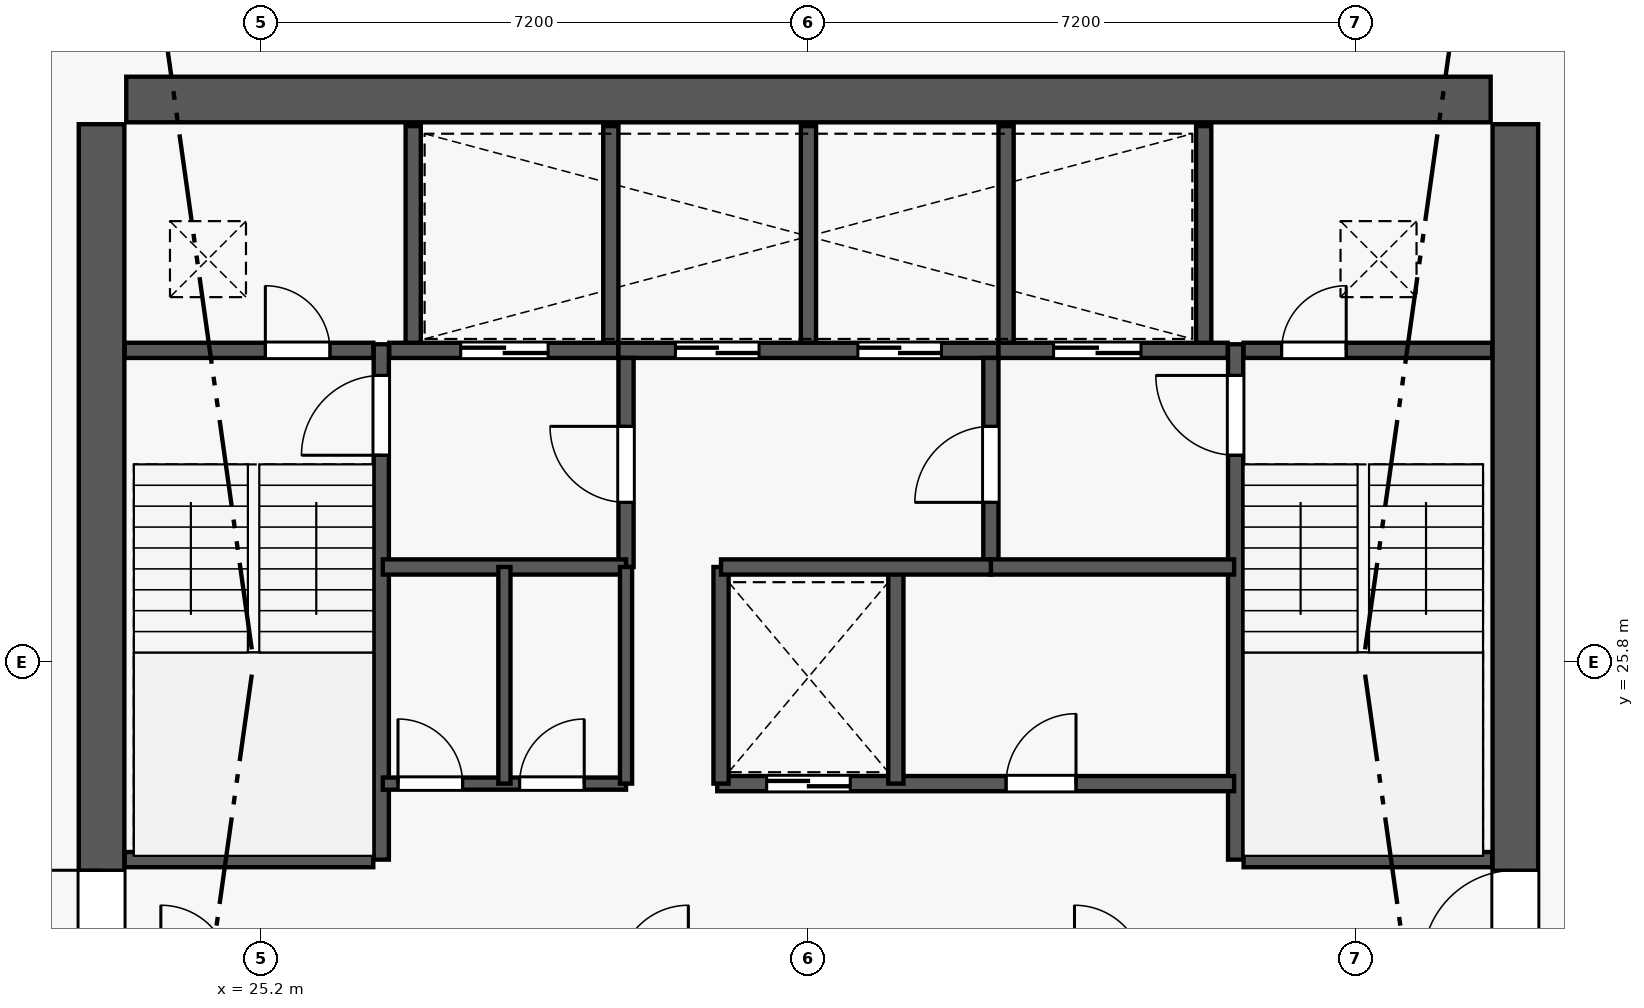
"""IFC4 building model, lengths in metres.
Left out: names, types, materials, properties, quantities, classifications, styles, units other than length and angle.
Written with IfcOpenShell. Run it as: python <this file> out.ifc"""

import sys

from ifc_helpers import new_model, si_unit, direction, frame, frame_2d, origin, origin_2d, place, context, subcontext, project, spatial, rectangle, extrude, element, fill, save


model = new_model("IFC4")
c1 = context("Model", 3, precision=1e-05, world=origin(), true_north=direction((0.0, 1.0)))
c2 = subcontext(c1, "Body", "Model", "MODEL_VIEW")
j1 = project(units=[si_unit("LENGTHUNIT", "METRE"), si_unit("PLANEANGLEUNIT", "RADIAN")], contexts=[c1])
p1 = place(None, origin())
s1 = spatial("IfcSite", under=j1, at=p1, CompositionType="ELEMENT")
p2 = place(p1, origin())
s2 = spatial("IfcBuilding", under=s1, at=p2, CompositionType="ELEMENT")
p3 = place(p2, frame((0.0, 0.0, 186.1)))
s3 = spatial("IfcBuildingStorey", under=s2, at=p3, CompositionType="ELEMENT", Elevation=186.1)
for number, where, z_axis, x_axis in (
    (1, (41.7, 33.2, 0.0), (0.0, 0.0, 1.0), (1.0, 0.0, 0.0)),
    (2, (23.1, 33.2, 0.0), (0.0, 0.0, 1.0), (1.0, 0.0, 0.0)),
):
    element("IfcColumn", number, at=place(p3, frame(where, z_axis=z_axis, x_axis=x_axis)), inside=s3, PredefinedType="COLUMN", context=c2, shape_type="SweptSolid", body=[
        extrude(rectangle(XDim=0.65, YDim=0.65, at=origin_2d()), origin(), (0.0, 0.0, 1.0), 3.55),
    ])
p4 = place(p3, frame((23.425, 33.2, 0.0), z_axis=(0.0, 0.0, 1.0), x_axis=(1.0, 0.0, 0.0)))
e3 = element("IfcWall", 3, at=p4, inside=s3, PredefinedType="SHEAR", context=c2, shape_type="SweptSolid", body=[
    extrude(rectangle(XDim=17.95, YDim=0.6, at=frame_2d((8.975, 0.0))), origin(), (0.0, 0.0, 1.0), 3.35),
])
p5 = place(p3, frame((23.1, 18.925, 0.0), z_axis=(0.0, 0.0, 1.0), x_axis=(0.0, 1.0, 0.0)))
e4 = element("IfcWall", 4, at=p5, inside=s3, PredefinedType="SHEAR", context=c2, shape_type="SweptSolid", body=[
    extrude(rectangle(XDim=13.95, YDim=0.6, at=frame_2d((6.975, 0.0))), origin(), (0.0, 0.0, 1.0), 3.35),
])
p6 = place(p5, frame((2.915, 0.0, 0.0)))
e5 = element("IfcOpeningElement", 5, at=p6, cuts=e4, PredefinedType="OPENING", context=c2, shape_type="SweptSolid", body=[
    extrude(rectangle(XDim=1.22, YDim=2.25, at=frame_2d((0.61, 1.125))), frame((0.0, 0.31, 0.0), z_axis=(0.0, -1.0, 0.0), x_axis=(1.0, 0.0, 0.0)), (0.0, 0.0, 1.0), 0.62),
])
p7 = place(p3, frame((41.7, 18.925, 0.0), z_axis=(0.0, 0.0, 1.0), x_axis=(0.0, 1.0, 0.0)))
e6 = element("IfcWall", 6, at=p7, inside=s3, PredefinedType="SHEAR", context=c2, shape_type="SweptSolid", body=[
    extrude(rectangle(XDim=13.95, YDim=0.6, at=frame_2d((6.975, 0.0))), origin(), (0.0, 0.0, 1.0), 3.35),
])
p8 = place(p7, frame((2.915, 0.0, 0.0)))
e7 = element("IfcOpeningElement", 7, at=p8, cuts=e6, PredefinedType="OPENING", context=c2, shape_type="SweptSolid", body=[
    extrude(rectangle(XDim=1.22, YDim=2.25, at=frame_2d((0.61, 1.125))), frame((0.0, 0.31, 0.0), z_axis=(0.0, -1.0, 0.0), x_axis=(1.0, 0.0, 0.0)), (0.0, 0.0, 1.0), 0.62),
])
p9 = place(p3, frame((26.78, 23.2, 0.0), z_axis=(0.0, 0.0, 1.0), x_axis=(0.0, 1.0, 0.0)))
e8 = element("IfcWall", 8, at=p9, inside=s3, PredefinedType="SHEAR", context=c2, shape_type="SweptSolid", body=[
    extrude(rectangle(XDim=6.78, YDim=0.2, at=frame_2d((3.39, 0.0))), origin(), (0.0, 0.0, 1.0), 3.55),
])
p10 = place(p9, frame((5.32, 0.0, 0.0)))
e9 = element("IfcOpeningElement", 9, at=p10, cuts=e8, PredefinedType="OPENING", context=c2, shape_type="SweptSolid", body=[
    extrude(rectangle(XDim=1.05, YDim=2.15, at=frame_2d((0.525, 1.075))), frame((0.0, 0.11, 0.0), z_axis=(0.0, -1.0, 0.0), x_axis=(1.0, 0.0, 0.0)), (0.0, 0.0, 1.0), 0.22),
])
p11 = place(p3, frame((23.405, 23.2, 0.0), z_axis=(0.0, 0.0, 1.0), x_axis=(1.0, 0.0, 0.0)))
e10 = element("IfcWall", 10, at=p11, inside=s3, PredefinedType="PLUMBINGWALL", context=c2, shape_type="SweptSolid", body=[
    extrude(rectangle(XDim=3.27, YDim=0.2, at=frame_2d((1.635, 0.0))), origin(), (0.0, 0.0, 1.0), 3.35),
])
p12 = place(p3, frame((38.02, 23.2, 0.0), z_axis=(0.0, 0.0, 1.0), x_axis=(0.0, 1.0, 0.0)))
e11 = element("IfcWall", 11, at=p12, inside=s3, PredefinedType="SHEAR", context=c2, shape_type="SweptSolid", body=[
    extrude(rectangle(XDim=6.78, YDim=0.2, at=frame_2d((3.39, 0.0))), origin(), (0.0, 0.0, 1.0), 3.55),
])
p13 = place(p12, frame((5.32, 0.0, 0.0)))
e12 = element("IfcOpeningElement", 12, at=p13, cuts=e11, PredefinedType="OPENING", context=c2, shape_type="SweptSolid", body=[
    extrude(rectangle(XDim=1.05, YDim=2.15, at=frame_2d((0.525, 1.075))), frame((0.0, 0.11, 0.0), z_axis=(0.0, -1.0, 0.0), x_axis=(1.0, 0.0, 0.0)), (0.0, 0.0, 1.0), 0.22),
])
p14 = place(p3, frame((38.125, 23.2, 0.0), z_axis=(0.0, 0.0, 1.0), x_axis=(1.0, 0.0, 0.0)))
e13 = element("IfcWall", 13, at=p14, inside=s3, PredefinedType="PLUMBINGWALL", context=c2, shape_type="SweptSolid", body=[
    extrude(rectangle(XDim=3.27, YDim=0.2, at=frame_2d((1.635, 0.0))), origin(), (0.0, 0.0, 1.0), 3.35),
])
p15 = place(p3, frame((23.405, 29.9, 0.0), z_axis=(0.0, 0.0, 1.0), x_axis=(1.0, 0.0, 0.0)))
e14 = element("IfcWall", 14, at=p15, inside=s3, PredefinedType="PLUMBINGWALL", context=c2, shape_type="SweptSolid", body=[
    extrude(rectangle(XDim=3.27, YDim=0.2, at=frame_2d((1.635, 0.0))), origin(), (0.0, 0.0, 1.0), 3.35),
])
p16 = place(p15, frame((1.85, 0.0, 0.0)))
e15 = element("IfcOpeningElement", 15, at=p16, cuts=e14, PredefinedType="OPENING", context=c2, shape_type="SweptSolid", body=[
    extrude(rectangle(XDim=0.85, YDim=2.05, at=frame_2d((0.425, 1.025))), frame((0.0, 0.11, 0.0), z_axis=(0.0, -1.0, 0.0), x_axis=(1.0, 0.0, 0.0)), (0.0, 0.0, 1.0), 0.22),
])
p17 = place(p3, frame((26.885, 29.9, 0.0), z_axis=(0.0, 0.0, 1.0), x_axis=(1.0, 0.0, 0.0)))
e16 = element("IfcWall", 16, at=p17, inside=s3, PredefinedType="PLUMBINGWALL", context=c2, shape_type="SweptSolid", body=[
    extrude(rectangle(XDim=3.015, YDim=0.2, at=frame_2d((1.507, 0.0))), origin(), (0.0, 0.0, 1.0), 3.35),
])
p18 = place(p17, frame((0.94, 0.0, 0.0)))
e17 = element("IfcOpeningElement", 17, at=p18, cuts=e16, PredefinedType="OPENING", context=c2, shape_type="SweptSolid", body=[
    extrude(rectangle(XDim=1.15, YDim=2.2, at=frame_2d((0.575, 1.1))), frame((0.0, 0.11, 0.0), z_axis=(0.0, -1.0, 0.0), x_axis=(1.0, 0.0, 0.0)), (0.0, 0.0, 1.0), 0.22),
])
p19 = place(p3, frame((29.9, 29.9, 0.0), z_axis=(0.0, 0.0, 1.0), x_axis=(1.0, 0.0, 0.0)))
e18 = element("IfcWall", 18, at=p19, inside=s3, PredefinedType="PLUMBINGWALL", context=c2, shape_type="SweptSolid", body=[
    extrude(rectangle(XDim=5.0, YDim=0.2, at=frame_2d((2.5, 0.0))), origin(), (0.0, 0.0, 1.0), 3.35),
])
p20 = place(p19, frame((0.75, 0.0, 0.0)))
e19 = element("IfcOpeningElement", 19, at=p20, cuts=e18, PredefinedType="OPENING", context=c2, shape_type="SweptSolid", body=[
    extrude(rectangle(XDim=1.1, YDim=2.2, at=frame_2d((0.55, 1.1))), frame((0.0, 0.11, 0.0), z_axis=(0.0, -1.0, 0.0), x_axis=(1.0, 0.0, 0.0)), (0.0, 0.0, 1.0), 0.22),
])
p21 = place(p19, frame((3.15, 0.0, 0.0)))
e20 = element("IfcOpeningElement", 20, at=p21, cuts=e18, PredefinedType="OPENING", context=c2, shape_type="SweptSolid", body=[
    extrude(rectangle(XDim=1.1, YDim=2.2, at=frame_2d((0.55, 1.1))), frame((0.0, 0.11, 0.0), z_axis=(0.0, -1.0, 0.0), x_axis=(1.0, 0.0, 0.0)), (0.0, 0.0, 1.0), 0.22),
])
p22 = place(p3, frame((34.9, 29.9, 0.0), z_axis=(0.0, 0.0, 1.0), x_axis=(1.0, 0.0, 0.0)))
e21 = element("IfcWall", 21, at=p22, inside=s3, PredefinedType="PLUMBINGWALL", context=c2, shape_type="SweptSolid", body=[
    extrude(rectangle(XDim=3.015, YDim=0.2, at=frame_2d((1.508, 0.0))), origin(), (0.0, 0.0, 1.0), 3.35),
])
p23 = place(p22, frame((0.725, 0.0, 0.0)))
e22 = element("IfcOpeningElement", 22, at=p23, cuts=e21, PredefinedType="OPENING", context=c2, shape_type="SweptSolid", body=[
    extrude(rectangle(XDim=1.15, YDim=2.2, at=frame_2d((0.575, 1.1))), frame((0.0, 0.11, 0.0), z_axis=(0.0, -1.0, 0.0), x_axis=(1.0, 0.0, 0.0)), (0.0, 0.0, 1.0), 0.22),
])
p24 = place(p3, frame((38.125, 29.9, 0.0), z_axis=(0.0, 0.0, 1.0), x_axis=(1.0, 0.0, 0.0)))
e23 = element("IfcWall", 23, at=p24, inside=s3, PredefinedType="PLUMBINGWALL", context=c2, shape_type="SweptSolid", body=[
    extrude(rectangle(XDim=3.27, YDim=0.2, at=frame_2d((1.635, 0.0))), origin(), (0.0, 0.0, 1.0), 3.35),
])
p25 = place(p24, frame((0.5, 0.0, 0.0)))
e24 = element("IfcOpeningElement", 24, at=p25, cuts=e23, PredefinedType="OPENING", context=c2, shape_type="SweptSolid", body=[
    extrude(rectangle(XDim=0.85, YDim=2.05, at=frame_2d((0.425, 1.025))), frame((0.0, 0.11, 0.0), z_axis=(0.0, -1.0, 0.0), x_axis=(1.0, 0.0, 0.0)), (0.0, 0.0, 1.0), 0.22),
])
for number, where, z_axis, x_axis in (
    (25, (27.2, 30.0, 0.0), (0.0, 0.0, 1.0), (0.0, 1.0, 0.0)),
    (26, (29.8, 30.0, 0.0), (0.0, 0.0, 1.0), (0.0, 1.0, 0.0)),
    (27, (32.4, 30.0, 0.0), (0.0, 0.0, 1.0), (0.0, 1.0, 0.0)),
    (28, (35.0, 30.0, 0.0), (0.0, 0.0, 1.0), (0.0, 1.0, 0.0)),
    (29, (37.6, 30.0, 0.0), (0.0, 0.0, 1.0), (0.0, 1.0, 0.0)),
):
    element("IfcWall", number, at=place(p3, frame(where, z_axis=z_axis, x_axis=x_axis)), inside=s3, PredefinedType="PLUMBINGWALL", context=c2, shape_type="SweptSolid", body=[
        extrude(rectangle(XDim=2.85, YDim=0.2, at=frame_2d((1.425, 0.0))), origin(), (0.0, 0.0, 1.0), 3.35),
    ])
p26 = place(p3, frame((30.0, 27.05, 0.0), z_axis=(0.0, 0.0, 1.0), x_axis=(0.0, 1.0, 0.0)))
e30 = element("IfcWall", 30, at=p26, inside=s3, PredefinedType="PLUMBINGWALL", context=c2, shape_type="SweptSolid", body=[
    extrude(rectangle(XDim=2.75, YDim=0.2, at=frame_2d((1.375, 0.0))), origin(), (0.0, 0.0, 1.0), 3.35),
])
p27 = place(p26, frame((0.85, 0.0, 0.0)))
e31 = element("IfcOpeningElement", 31, at=p27, cuts=e30, PredefinedType="OPENING", context=c2, shape_type="SweptSolid", body=[
    extrude(rectangle(XDim=1.0, YDim=2.15, at=frame_2d((0.5, 1.075))), frame((0.0, 0.11, 0.0), z_axis=(0.0, -1.0, 0.0), x_axis=(1.0, 0.0, 0.0)), (0.0, 0.0, 1.0), 0.22),
])
p28 = place(p3, frame((26.8, 27.05, 0.0), z_axis=(0.0, 0.0, 1.0), x_axis=(1.0, 0.0, 0.0)))
e32 = element("IfcWall", 32, at=p28, inside=s3, PredefinedType="PLUMBINGWALL", context=c2, shape_type="SweptSolid", body=[
    extrude(rectangle(XDim=3.2, YDim=0.2, at=frame_2d((1.6, 0.0))), origin(), (0.0, 0.0, 1.0), 3.35),
])
p29 = place(p3, frame((34.8, 27.05, 0.0), z_axis=(0.0, 0.0, 1.0), x_axis=(0.0, 1.0, 0.0)))
e33 = element("IfcWall", 33, at=p29, inside=s3, PredefinedType="PLUMBINGWALL", context=c2, shape_type="SweptSolid", body=[
    extrude(rectangle(XDim=2.75, YDim=0.2, at=frame_2d((1.375, 0.0))), origin(), (0.0, 0.0, 1.0), 3.35),
])
p30 = place(p29, frame((0.85, 0.0, 0.0)))
e34 = element("IfcOpeningElement", 34, at=p30, cuts=e33, PredefinedType="OPENING", context=c2, shape_type="SweptSolid", body=[
    extrude(rectangle(XDim=1.0, YDim=2.15, at=frame_2d((0.5, 1.075))), frame((0.0, 0.11, 0.0), z_axis=(0.0, -1.0, 0.0), x_axis=(1.0, 0.0, 0.0)), (0.0, 0.0, 1.0), 0.22),
])
p31 = place(p3, frame((34.8, 27.05, 0.0), z_axis=(0.0, 0.0, 1.0), x_axis=(1.0, 0.0, 0.0)))
e35 = element("IfcWall", 35, at=p31, inside=s3, PredefinedType="PLUMBINGWALL", context=c2, shape_type="SweptSolid", body=[
    extrude(rectangle(XDim=3.2, YDim=0.2, at=frame_2d((1.6, 0.0))), origin(), (0.0, 0.0, 1.0), 3.35),
])
p32 = place(p3, frame((26.8, 24.2, 0.0), z_axis=(0.0, 0.0, 1.0), x_axis=(1.0, 0.0, 0.0)))
e36 = element("IfcWall", 36, at=p32, inside=s3, PredefinedType="PARTITIONING", context=c2, shape_type="SweptSolid", body=[
    extrude(rectangle(XDim=3.2, YDim=0.16, at=frame_2d((1.6, 0.0))), origin(), (0.0, 0.0, 1.0), 3.35),
])
p33 = place(p32, frame((0.2, 0.0, 0.0)))
e37 = element("IfcOpeningElement", 37, at=p33, cuts=e36, PredefinedType="OPENING", context=c2, shape_type="SweptSolid", body=[
    extrude(rectangle(XDim=0.85, YDim=2.05, at=frame_2d((0.425, 1.025))), frame((0.0, 0.09, 0.0), z_axis=(0.0, -1.0, 0.0), x_axis=(1.0, 0.0, 0.0)), (0.0, 0.0, 1.0), 0.18),
])
p34 = place(p32, frame((1.8, 0.0, 0.0)))
e38 = element("IfcOpeningElement", 38, at=p34, cuts=e36, PredefinedType="OPENING", context=c2, shape_type="SweptSolid", body=[
    extrude(rectangle(XDim=0.85, YDim=2.05, at=frame_2d((0.425, 1.025))), frame((0.0, 0.09, 0.0), z_axis=(0.0, -1.0, 0.0), x_axis=(1.0, 0.0, 0.0)), (0.0, 0.0, 1.0), 0.18),
])
p35 = place(p3, frame((30.0, 24.2, 0.0), z_axis=(0.0, 0.0, 1.0), x_axis=(0.0, 1.0, 0.0)))
e39 = element("IfcWall", 39, at=p35, inside=s3, PredefinedType="PARTITIONING", context=c2, shape_type="SweptSolid", body=[
    extrude(rectangle(XDim=2.85, YDim=0.16, at=frame_2d((1.425, 0.0))), origin(), (0.0, 0.0, 1.0), 3.35),
])
p36 = place(p3, frame((31.2, 24.2, 0.0), z_axis=(0.0, 0.0, 1.0), x_axis=(1.0, 0.0, 0.0)))
e40 = element("IfcWall", 40, at=p36, inside=s3, PredefinedType="PLUMBINGWALL", context=c2, shape_type="SweptSolid", body=[
    extrude(rectangle(XDim=6.8, YDim=0.2, at=frame_2d((3.4, 0.0))), origin(), (0.0, 0.0, 1.0), 3.35),
])
p37 = place(p36, frame((0.65, 0.0, 0.0)))
e41 = element("IfcOpeningElement", 41, at=p37, cuts=e40, PredefinedType="OPENING", context=c2, shape_type="SweptSolid", body=[
    extrude(rectangle(XDim=1.1, YDim=2.2, at=frame_2d((0.55, 1.1))), frame((0.0, 0.11, 0.0), z_axis=(0.0, -1.0, 0.0), x_axis=(1.0, 0.0, 0.0)), (0.0, 0.0, 1.0), 0.22),
])
p38 = place(p36, frame((3.8, 0.0, 0.0)))
e42 = element("IfcOpeningElement", 42, at=p38, cuts=e40, PredefinedType="OPENING", context=c2, shape_type="SweptSolid", body=[
    extrude(rectangle(XDim=0.92, YDim=2.15, at=frame_2d((0.46, 1.075))), frame((0.0, 0.11, 0.0), z_axis=(0.0, -1.0, 0.0), x_axis=(1.0, 0.0, 0.0)), (0.0, 0.0, 1.0), 0.22),
])
for number, where, z_axis, x_axis in (
    (43, (31.25, 24.2, 0.0), (0.0, 0.0, 1.0), (0.0, 1.0, 0.0)),
    (44, (33.55, 24.2, 0.0), (0.0, 0.0, 1.0), (0.0, 1.0, 0.0)),
):
    element("IfcWall", number, at=place(p3, frame(where, z_axis=z_axis, x_axis=x_axis)), inside=s3, PredefinedType="PLUMBINGWALL", context=c2, shape_type="SweptSolid", body=[
        extrude(rectangle(XDim=2.85, YDim=0.2, at=frame_2d((1.425, 0.0))), origin(), (0.0, 0.0, 1.0), 3.35),
    ])
p39 = place(p3, frame((31.25, 27.05, 0.0), z_axis=(0.0, 0.0, 1.0), x_axis=(1.0, 0.0, 0.0)))
e45 = element("IfcWall", 45, at=p39, inside=s3, PredefinedType="PLUMBINGWALL", context=c2, shape_type="SweptSolid", body=[
    extrude(rectangle(XDim=3.55, YDim=0.2, at=frame_2d((1.775, 0.0))), origin(), (0.0, 0.0, 1.0), 3.35),
])
p40 = place(p3, frame((28.4, 24.2, 0.0), z_axis=(0.0, 0.0, 1.0), x_axis=(0.0, 1.0, 0.0)))
e46 = element("IfcWall", 46, at=p40, inside=s3, PredefinedType="PARTITIONING", context=c2, shape_type="SweptSolid", body=[
    extrude(rectangle(XDim=2.85, YDim=0.16, at=frame_2d((1.425, 0.0))), origin(), (0.0, 0.0, 1.0), 3.35),
])
p41 = place(p6, origin())
e47 = element("IfcDoor", 47, at=p41, inside=s3, OperationType="SINGLE_SWING_RIGHT", PredefinedType="DOOR", context=c2, shape_type="SweptSolid", body=[
    extrude(rectangle(XDim=1.22, YDim=2.25, at=frame_2d((0.61, 1.125))), frame((0.0, 0.025, 0.0), z_axis=(0.0, -1.0, 0.0), x_axis=(1.0, 0.0, 0.0)), (0.0, 0.0, 1.0), 0.05),
])
fill(e5, e47)
p42 = place(p8, origin())
e48 = element("IfcDoor", 48, at=p42, inside=s3, OperationType="SINGLE_SWING_LEFT", PredefinedType="DOOR", context=c2, shape_type="SweptSolid", body=[
    extrude(rectangle(XDim=1.22, YDim=2.25, at=frame_2d((0.61, 1.125))), frame((0.0, 0.025, 0.0), z_axis=(0.0, -1.0, 0.0), x_axis=(1.0, 0.0, 0.0)), (0.0, 0.0, 1.0), 0.05),
])
fill(e7, e48)
p43 = place(p10, origin())
e49 = element("IfcDoor", 49, at=p43, inside=s3, OperationType="SINGLE_SWING_LEFT", PredefinedType="DOOR", context=c2, shape_type="SweptSolid", body=[
    extrude(rectangle(XDim=1.05, YDim=2.15, at=frame_2d((0.525, 1.075))), frame((0.0, 0.025, 0.0), z_axis=(0.0, -1.0, 0.0), x_axis=(1.0, 0.0, 0.0)), (0.0, 0.0, 1.0), 0.05),
])
fill(e9, e49)
p44 = place(p13, origin())
e50 = element("IfcDoor", 50, at=p44, inside=s3, OperationType="SINGLE_SWING_RIGHT", PredefinedType="DOOR", context=c2, shape_type="SweptSolid", body=[
    extrude(rectangle(XDim=1.05, YDim=2.15, at=frame_2d((0.525, 1.075))), frame((0.0, 0.025, 0.0), z_axis=(0.0, -1.0, 0.0), x_axis=(1.0, 0.0, 0.0)), (0.0, 0.0, 1.0), 0.05),
])
fill(e12, e50)
p45 = place(p16, origin())
e51 = element("IfcDoor", 51, at=p45, inside=s3, OperationType="SINGLE_SWING_LEFT", PredefinedType="DOOR", context=c2, shape_type="SweptSolid", body=[
    extrude(rectangle(XDim=0.85, YDim=2.05, at=frame_2d((0.425, 1.025))), frame((0.0, 0.025, 0.0), z_axis=(0.0, -1.0, 0.0), x_axis=(1.0, 0.0, 0.0)), (0.0, 0.0, 1.0), 0.05),
])
fill(e15, e51)
p46 = place(p25, origin())
e52 = element("IfcDoor", 52, at=p46, inside=s3, OperationType="SINGLE_SWING_RIGHT", PredefinedType="DOOR", context=c2, shape_type="SweptSolid", body=[
    extrude(rectangle(XDim=0.85, YDim=2.05, at=frame_2d((0.425, 1.025))), frame((0.0, 0.025, 0.0), z_axis=(0.0, -1.0, 0.0), x_axis=(1.0, 0.0, 0.0)), (0.0, 0.0, 1.0), 0.05),
])
fill(e24, e52)
p47 = place(p18, origin())
e53 = element("IfcDoor", 53, at=p47, inside=s3, OperationType="DOUBLE_DOOR_SLIDING", PredefinedType="DOOR", context=c2, shape_type="SweptSolid", body=[
    extrude(rectangle(XDim=1.15, YDim=2.2, at=frame_2d((0.575, 1.1))), frame((0.0, 0.025, 0.0), z_axis=(0.0, -1.0, 0.0), x_axis=(1.0, 0.0, 0.0)), (0.0, 0.0, 1.0), 0.05),
])
fill(e17, e53)
p48 = place(p23, origin())
e54 = element("IfcDoor", 54, at=p48, inside=s3, OperationType="DOUBLE_DOOR_SLIDING", PredefinedType="DOOR", context=c2, shape_type="SweptSolid", body=[
    extrude(rectangle(XDim=1.15, YDim=2.2, at=frame_2d((0.575, 1.1))), frame((0.0, 0.025, 0.0), z_axis=(0.0, -1.0, 0.0), x_axis=(1.0, 0.0, 0.0)), (0.0, 0.0, 1.0), 0.05),
])
fill(e22, e54)
p49 = place(p20, origin())
e55 = element("IfcDoor", 55, at=p49, inside=s3, OperationType="DOUBLE_DOOR_SLIDING", PredefinedType="DOOR", context=c2, shape_type="SweptSolid", body=[
    extrude(rectangle(XDim=1.1, YDim=2.2, at=frame_2d((0.55, 1.1))), frame((0.0, 0.025, 0.0), z_axis=(0.0, -1.0, 0.0), x_axis=(1.0, 0.0, 0.0)), (0.0, 0.0, 1.0), 0.05),
])
fill(e19, e55)
p50 = place(p21, origin())
e56 = element("IfcDoor", 56, at=p50, inside=s3, OperationType="DOUBLE_DOOR_SLIDING", PredefinedType="DOOR", context=c2, shape_type="SweptSolid", body=[
    extrude(rectangle(XDim=1.1, YDim=2.2, at=frame_2d((0.55, 1.1))), frame((0.0, 0.025, 0.0), z_axis=(0.0, -1.0, 0.0), x_axis=(1.0, 0.0, 0.0)), (0.0, 0.0, 1.0), 0.05),
])
fill(e20, e56)
p51 = place(p27, origin())
e57 = element("IfcDoor", 57, at=p51, inside=s3, OperationType="SINGLE_SWING_RIGHT", PredefinedType="DOOR", context=c2, shape_type="SweptSolid", body=[
    extrude(rectangle(XDim=1.0, YDim=2.15, at=frame_2d((0.5, 1.075))), frame((0.0, 0.025, 0.0), z_axis=(0.0, -1.0, 0.0), x_axis=(1.0, 0.0, 0.0)), (0.0, 0.0, 1.0), 0.05),
])
fill(e31, e57)
p52 = place(p30, origin())
e58 = element("IfcDoor", 58, at=p52, inside=s3, OperationType="SINGLE_SWING_LEFT", PredefinedType="DOOR", context=c2, shape_type="SweptSolid", body=[
    extrude(rectangle(XDim=1.0, YDim=2.15, at=frame_2d((0.5, 1.075))), frame((0.0, 0.025, 0.0), z_axis=(0.0, -1.0, 0.0), x_axis=(1.0, 0.0, 0.0)), (0.0, 0.0, 1.0), 0.05),
])
fill(e34, e58)
p53 = place(p37, origin())
e59 = element("IfcDoor", 59, at=p53, inside=s3, OperationType="DOUBLE_DOOR_SLIDING", PredefinedType="DOOR", context=c2, shape_type="SweptSolid", body=[
    extrude(rectangle(XDim=1.1, YDim=2.2, at=frame_2d((0.55, 1.1))), frame((0.0, 0.025, 0.0), z_axis=(0.0, -1.0, 0.0), x_axis=(1.0, 0.0, 0.0)), (0.0, 0.0, 1.0), 0.05),
])
fill(e41, e59)
p54 = place(p33, origin())
e60 = element("IfcDoor", 60, at=p54, inside=s3, OperationType="SINGLE_SWING_LEFT", PredefinedType="DOOR", context=c2, shape_type="SweptSolid", body=[
    extrude(rectangle(XDim=0.85, YDim=2.05, at=frame_2d((0.425, 1.025))), frame((0.0, 0.025, 0.0), z_axis=(0.0, -1.0, 0.0), x_axis=(1.0, 0.0, 0.0)), (0.0, 0.0, 1.0), 0.05),
])
fill(e37, e60)
p55 = place(p34, origin())
e61 = element("IfcDoor", 61, at=p55, inside=s3, OperationType="SINGLE_SWING_RIGHT", PredefinedType="DOOR", context=c2, shape_type="SweptSolid", body=[
    extrude(rectangle(XDim=0.85, YDim=2.05, at=frame_2d((0.425, 1.025))), frame((0.0, 0.025, 0.0), z_axis=(0.0, -1.0, 0.0), x_axis=(1.0, 0.0, 0.0)), (0.0, 0.0, 1.0), 0.05),
])
fill(e38, e61)
p56 = place(p38, origin())
e62 = element("IfcDoor", 62, at=p56, inside=s3, OperationType="SINGLE_SWING_RIGHT", PredefinedType="DOOR", context=c2, shape_type="SweptSolid", body=[
    extrude(rectangle(XDim=0.92, YDim=2.15, at=frame_2d((0.46, 1.075))), frame((0.0, 0.025, 0.0), z_axis=(0.0, -1.0, 0.0), x_axis=(1.0, 0.0, 0.0)), (0.0, 0.0, 1.0), 0.05),
])
fill(e42, e62)
save(model, sys.argv[1])
